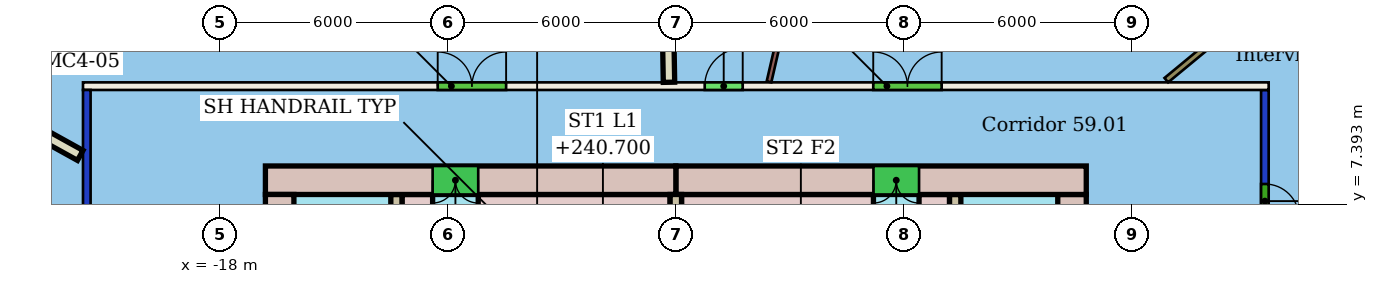
"""IFC4 building model, lengths in metres.
Left out: names, types, materials, properties, quantities, classifications, styles, units other than length and angle.
Written with IfcOpenShell. Run it as: python <this file> out.ifc"""

import sys

from ifc_helpers import new_model, si_unit, direction, frame, frame_2d, origin, place, context, subcontext, project, spatial, rectangle, extrude, element, fill, save


model = new_model("IFC4")
c1 = context("Model", 3, precision=1e-05, world=origin(), true_north=direction((0.0, 1.0)))
c2 = subcontext(c1, "Body", "Model", "MODEL_VIEW")
j1 = project(units=[si_unit("LENGTHUNIT", "METRE"), si_unit("PLANEANGLEUNIT", "RADIAN")], contexts=[c1])
p1 = place(None, origin())
s1 = spatial("IfcSite", under=j1, at=p1, CompositionType="ELEMENT")
p2 = place(p1, origin())
s2 = spatial("IfcBuilding", under=s1, at=p2, CompositionType="ELEMENT")
p3 = place(p2, frame((0.0, 0.0, 238.9)))
s3 = spatial("IfcBuildingStorey", under=s2, at=p3, CompositionType="ELEMENT", Elevation=238.9)
p4 = place(p3, frame((-21.5, -10.4, 0.0), z_axis=(0.0, 0.0, 1.0), x_axis=(0.0, 1.0, 0.0)))
e1 = element("IfcWall", 1, at=p4, inside=s3, PredefinedType="PARTITIONING", context=c2, shape_type="SweptSolid", body=[
    extrude(rectangle(XDim=20.8, YDim=0.2, at=frame_2d((10.4, 0.0))), origin(), (0.0, 0.0, 1.0), 3.0),
])
p5 = place(p4, frame((13.367, 0.0, 0.0)))
e2 = element("IfcOpeningElement", 2, at=p5, cuts=e1, PredefinedType="OPENING", context=c2, shape_type="SweptSolid", body=[
    extrude(rectangle(XDim=1.2, YDim=2.4, at=frame_2d((0.6, 1.2))), frame((0.0, 0.11, 0.0), z_axis=(0.0, -1.0, 0.0), x_axis=(1.0, 0.0, 0.0)), (0.0, 0.0, 1.0), 0.22),
])
p6 = place(p4, frame((6.326, 0.0, 0.0)))
e3 = element("IfcOpeningElement", 3, at=p6, cuts=e1, PredefinedType="OPENING", context=c2, shape_type="SweptSolid", body=[
    extrude(rectangle(XDim=1.8, YDim=2.4, at=frame_2d((0.9, 1.2))), frame((0.0, 0.11, 0.0), z_axis=(0.0, -1.0, 0.0), x_axis=(1.0, 0.0, 0.0)), (0.0, 0.0, 1.0), 0.22),
])
p7 = place(p3, frame((-21.6, 10.5, 0.0), z_axis=(0.0, 0.0, 1.0), x_axis=(1.0, 0.0, 0.0)))
e4 = element("IfcWall", 4, at=p7, inside=s3, PredefinedType="PARTITIONING", context=c2, shape_type="SweptSolid", body=[
    extrude(rectangle(XDim=31.2, YDim=0.2, at=frame_2d((15.6, 0.0))), origin(), (0.0, 0.0, 1.0), 3.4),
])
p8 = place(p7, frame((16.36, 0.0, 0.0)))
e5 = element("IfcOpeningElement", 5, at=p8, cuts=e4, PredefinedType="OPENING", context=c2, shape_type="SweptSolid", body=[
    extrude(rectangle(XDim=1.0, YDim=2.4, at=frame_2d((0.5, 1.2))), frame((0.0, 0.11, 0.0), z_axis=(0.0, -1.0, 0.0), x_axis=(1.0, 0.0, 0.0)), (0.0, 0.0, 1.0), 0.22),
])
p9 = place(p7, frame((9.334, 0.0, 0.0)))
e6 = element("IfcOpeningElement", 6, at=p9, cuts=e4, PredefinedType="OPENING", context=c2, shape_type="SweptSolid", body=[
    extrude(rectangle(XDim=1.8, YDim=2.4, at=frame_2d((0.9, 1.2))), frame((0.0, 0.11, 0.0), z_axis=(0.0, -1.0, 0.0), x_axis=(1.0, 0.0, 0.0)), (0.0, 0.0, 1.0), 0.22),
])
p10 = place(p7, frame((20.795, 0.0, 0.0)))
e7 = element("IfcOpeningElement", 7, at=p10, cuts=e4, PredefinedType="OPENING", context=c2, shape_type="SweptSolid", body=[
    extrude(rectangle(XDim=1.8, YDim=2.4, at=frame_2d((0.9, 1.2))), frame((0.0, 0.11, 0.0), z_axis=(0.0, -1.0, 0.0), x_axis=(1.0, 0.0, 0.0)), (0.0, 0.0, 1.0), 0.22),
])
p11 = place(p3, frame((9.5, 10.4, 0.0), z_axis=(0.0, 0.0, 1.0), x_axis=(0.0, -1.0, 0.0)))
e8 = element("IfcWall", 8, at=p11, inside=s3, PredefinedType="PARTITIONING", context=c2, shape_type="SweptSolid", body=[
    extrude(rectangle(XDim=20.8, YDim=0.2, at=frame_2d((10.4, 0.0))), origin(), (0.0, 0.0, 1.0), 3.0),
])
p12 = place(p11, frame((7.867, 0.0, 0.0)))
e9 = element("IfcOpeningElement", 9, at=p12, cuts=e8, PredefinedType="OPENING", context=c2, shape_type="SweptSolid", body=[
    extrude(rectangle(XDim=1.5, YDim=2.1, at=frame_2d((0.75, 1.05))), frame((0.0, 0.11, 0.0), z_axis=(0.0, -1.0, 0.0), x_axis=(1.0, 0.0, 0.0)), (0.0, 0.0, 1.0), 0.22),
])
p13 = place(p11, frame((2.474, 0.0, 0.0)))
e10 = element("IfcOpeningElement", 10, at=p13, cuts=e8, PredefinedType="OPENING", context=c2, shape_type="SweptSolid", body=[
    extrude(rectangle(XDim=0.9, YDim=2.1, at=frame_2d((0.45, 1.05))), frame((0.0, 0.11, 0.0), z_axis=(0.0, -1.0, 0.0), x_axis=(1.0, 0.0, 0.0)), (0.0, 0.0, 1.0), 0.22),
])
p14 = place(p3, frame((-0.324, 24.575, 0.0), z_axis=(0.0, 0.0, 1.0), x_axis=(-0.225044916304, -0.974348390282, 0.0)))
e11 = element("IfcWall", 11, at=p14, inside=s3, PredefinedType="PARTITIONING", context=c2, shape_type="SweptSolid", body=[
    extrude(rectangle(XDim=14.329, YDim=0.125, at=frame_2d((7.165, 0.0))), origin(), (0.0, 0.0, 1.0), 3.4),
])
p15 = place(p3, frame((-6.409, 24.047, 0.0), z_axis=(0.0, 0.0, 1.0), x_axis=(0.016994712399, -0.999855579447, 0.0)))
e12 = element("IfcWall", 12, at=p15, inside=s3, PredefinedType="PARTITIONING", context=c2, shape_type="SweptSolid", body=[
    extrude(rectangle(XDim=13.446, YDim=0.3, at=frame_2d((6.723, 0.0))), origin(), (0.0, 0.0, 1.0), 3.4),
])
p16 = place(p3, frame((-24.895, 10.462, 0.0), z_axis=(0.0, 0.0, 1.0), x_axis=(0.874850568948, -0.484392900455, 0.0)))
e13 = element("IfcWall", 13, at=p16, inside=s3, PredefinedType="PARTITIONING", context=c2, shape_type="SweptSolid", body=[
    extrude(rectangle(XDim=3.683, YDim=0.3, at=frame_2d((1.841, 0.0))), origin(), (0.0, 0.0, 1.0), 3.4),
])
p17 = place(p3, frame((17.196, 8.382, 0.0), z_axis=(0.0, 0.0, 1.0), x_axis=(-0.94047829394, -0.339853760649, 0.0)))
e14 = element("IfcWall", 14, at=p17, inside=s3, PredefinedType="PARTITIONING", context=c2, shape_type="SweptSolid", body=[
    extrude(rectangle(XDim=8.054, YDim=0.125, at=frame_2d((4.027, 0.0))), origin(), (0.0, 0.0, 1.0), 3.4),
])
p18 = place(p3, frame((14.082, 16.583, 0.0), z_axis=(0.0, 0.0, 1.0), x_axis=(-0.771079906802, -0.636738390021, 0.0)))
e15 = element("IfcWall", 15, at=p18, inside=s3, PredefinedType="PARTITIONING", context=c2, shape_type="SweptSolid", body=[
    extrude(rectangle(XDim=9.306, YDim=0.15, at=frame_2d((4.653, 0.0))), origin(), (0.0, 0.0, 1.0), 3.4),
])
p19 = place(p3, frame((4.8, 8.025, 0.0), z_axis=(0.0, 0.0, 1.0), x_axis=(-1.0, 0.0, 0.0)))
e16 = element("IfcWall", 16, at=p19, inside=s3, PredefinedType="SHEAR", context=c2, shape_type="SweptSolid", body=[
    extrude(rectangle(XDim=10.8, YDim=0.75, at=frame_2d((5.4, 0.0))), origin(), (0.0, 0.0, 1.0), 3.3),
])
p20 = place(p19, frame((4.4, 0.0, 0.0)))
e17 = element("IfcOpeningElement", 17, at=p20, cuts=e16, PredefinedType="OPENING", context=c2, shape_type="SweptSolid", body=[
    extrude(rectangle(XDim=1.2, YDim=2.1, at=frame_2d((0.6, 1.05))), frame((0.0, 0.385, 0.0), z_axis=(0.0, -1.0, 0.0), x_axis=(1.0, 0.0, 0.0)), (0.0, 0.0, 1.0), 0.77),
])
p21 = place(p3, frame((-6.0, 8.025, 0.0), z_axis=(0.0, 0.0, 1.0), x_axis=(-1.0, 0.0, 0.0)))
e18 = element("IfcWall", 18, at=p21, inside=s3, PredefinedType="SHEAR", context=c2, shape_type="SweptSolid", body=[
    extrude(rectangle(XDim=10.8, YDim=0.75, at=frame_2d((5.4, 0.0))), origin(), (0.0, 0.0, 1.0), 3.3),
])
p22 = place(p21, frame((5.2, 0.0, 0.0)))
e19 = element("IfcOpeningElement", 19, at=p22, cuts=e18, PredefinedType="OPENING", context=c2, shape_type="SweptSolid", body=[
    extrude(rectangle(XDim=1.2, YDim=2.1, at=frame_2d((0.6, 1.05))), frame((0.0, 0.385, 0.0), z_axis=(0.0, -1.0, 0.0), x_axis=(1.0, 0.0, 0.0)), (0.0, 0.0, 1.0), 0.77),
])
p23 = place(p3, frame((-16.425, 7.65, 0.0), z_axis=(0.0, 0.0, 1.0), x_axis=(0.0, -1.0, 0.0)))
e20 = element("IfcWall", 20, at=p23, inside=s3, PredefinedType="SHEAR", context=c2, shape_type="SweptSolid", body=[
    extrude(rectangle(XDim=15.3, YDim=0.75, at=frame_2d((7.65, 0.0))), origin(), (0.0, 0.0, 1.0), 3.3),
])
p24 = place(p23, frame((11.25, 0.0, 0.0)))
e21 = element("IfcOpeningElement", 21, at=p24, cuts=e20, PredefinedType="OPENING", context=c2, shape_type="SweptSolid", body=[
    extrude(rectangle(XDim=1.2, YDim=2.1, at=frame_2d((0.6, 1.05))), frame((0.0, 0.385, 0.0), z_axis=(0.0, -1.0, 0.0), x_axis=(1.0, 0.0, 0.0)), (0.0, 0.0, 1.0), 0.77),
])
p25 = place(p23, frame((2.85, 0.0, 0.0)))
e22 = element("IfcOpeningElement", 22, at=p25, cuts=e20, PredefinedType="OPENING", context=c2, shape_type="SweptSolid", body=[
    extrude(rectangle(XDim=1.2, YDim=2.1, at=frame_2d((0.6, 1.05))), frame((0.0, 0.385, 0.0), z_axis=(0.0, -1.0, 0.0), x_axis=(1.0, 0.0, 0.0)), (0.0, 0.0, 1.0), 0.77),
])
p26 = place(p3, frame((4.425, -7.65, 0.0), z_axis=(0.0, 0.0, 1.0), x_axis=(0.0, 1.0, 0.0)))
e23 = element("IfcWall", 23, at=p26, inside=s3, PredefinedType="SHEAR", context=c2, shape_type="SweptSolid", body=[
    extrude(rectangle(XDim=15.3, YDim=0.75, at=frame_2d((7.65, 0.0))), origin(), (0.0, 0.0, 1.0), 3.3),
])
p27 = place(p26, frame((2.85, 0.0, 0.0)))
e24 = element("IfcOpeningElement", 24, at=p27, cuts=e23, PredefinedType="OPENING", context=c2, shape_type="SweptSolid", body=[
    extrude(rectangle(XDim=1.2, YDim=2.1, at=frame_2d((0.6, 1.05))), frame((0.0, 0.385, 0.0), z_axis=(0.0, -1.0, 0.0), x_axis=(1.0, 0.0, 0.0)), (0.0, 0.0, 1.0), 0.77),
])
p28 = place(p26, frame((11.25, 0.0, 0.0)))
e25 = element("IfcOpeningElement", 25, at=p28, cuts=e23, PredefinedType="OPENING", context=c2, shape_type="SweptSolid", body=[
    extrude(rectangle(XDim=1.2, YDim=2.1, at=frame_2d((0.6, 1.05))), frame((0.0, 0.385, 0.0), z_axis=(0.0, -1.0, 0.0), x_axis=(1.0, 0.0, 0.0)), (0.0, 0.0, 1.0), 0.77),
])
p29 = place(p3, frame((-13.35, 7.65, 0.0), z_axis=(0.0, 0.0, 1.0), x_axis=(0.0, -1.0, 0.0)))
e26 = element("IfcWall", 26, at=p29, inside=s3, PredefinedType="SHEAR", context=c2, shape_type="SweptSolid", body=[
    extrude(rectangle(XDim=15.3, YDim=0.3, at=frame_2d((7.65, 0.0))), origin(), (0.0, 0.0, 1.0), 3.3),
])
p30 = place(p29, frame((6.9, 0.0, 0.0)))
e27 = element("IfcOpeningElement", 27, at=p30, cuts=e26, PredefinedType="OPENING", context=c2, shape_type="SweptSolid", body=[
    extrude(rectangle(XDim=1.5, YDim=2.1, at=frame_2d((0.75, 1.05))), frame((0.0, 0.16, 0.0), z_axis=(0.0, -1.0, 0.0), x_axis=(1.0, 0.0, 0.0)), (0.0, 0.0, 1.0), 0.32),
])
p31 = place(p3, frame((1.35, -7.65, 0.0), z_axis=(0.0, 0.0, 1.0), x_axis=(0.0, 1.0, 0.0)))
e28 = element("IfcWall", 28, at=p31, inside=s3, PredefinedType="SHEAR", context=c2, shape_type="SweptSolid", body=[
    extrude(rectangle(XDim=15.3, YDim=0.3, at=frame_2d((7.65, 0.0))), origin(), (0.0, 0.0, 1.0), 3.3),
])
p32 = place(p31, frame((1.56, 0.0, 0.0)))
e29 = element("IfcOpeningElement", 29, at=p32, cuts=e28, PredefinedType="OPENING", context=c2, shape_type="SweptSolid", body=[
    extrude(rectangle(XDim=1.0, YDim=2.1, at=frame_2d((0.5, 1.05))), frame((0.0, 0.16, 0.0), z_axis=(0.0, -1.0, 0.0), x_axis=(1.0, 0.0, 0.0)), (0.0, 0.0, 1.0), 0.32),
])
p33 = place(p31, frame((6.9, 0.0, 0.0)))
e30 = element("IfcOpeningElement", 30, at=p33, cuts=e28, PredefinedType="OPENING", context=c2, shape_type="SweptSolid", body=[
    extrude(rectangle(XDim=1.5, YDim=2.1, at=frame_2d((0.75, 1.05))), frame((0.0, 0.16, 0.0), z_axis=(0.0, -1.0, 0.0), x_axis=(1.0, 0.0, 0.0)), (0.0, 0.0, 1.0), 0.32),
])
p34 = place(p3, frame((-6.0, 3.88, 0.0), z_axis=(0.0, 0.0, 1.0), x_axis=(0.0, 1.0, 0.0)))
e31 = element("IfcWall", 31, at=p34, inside=s3, PredefinedType="SHEAR", context=c2, shape_type="SweptSolid", body=[
    extrude(rectangle(XDim=3.77, YDim=0.3, at=frame_2d((1.885, 0.0))), origin(), (0.0, 0.0, 1.0), 3.3),
])
p35 = place(p3, frame((-13.2, 7.475, 0.0), z_axis=(0.0, 0.0, 1.0), x_axis=(1.0, 0.0, 0.0)))
e32 = element("IfcWall", 32, at=p35, inside=s3, PredefinedType="SHEAR", context=c2, shape_type="SweptSolid", body=[
    extrude(rectangle(XDim=0.8, YDim=0.35, at=frame_2d((0.4, 0.0))), origin(), (0.0, 0.0, 1.0), 3.3),
])
for number, where, z_axis, x_axis in (
    (33, (-11.2, 7.475, 0.0), (0.0, 0.0, 1.0), (1.0, 0.0, 0.0)),
    (34, (-5.85, 7.475, 0.0), (0.0, 0.0, 1.0), (1.0, 0.0, 0.0)),
):
    element("IfcWall", number, at=place(p3, frame(where, z_axis=z_axis, x_axis=x_axis)), inside=s3, PredefinedType="SHEAR", context=c2, shape_type="SweptSolid", body=[
        extrude(rectangle(XDim=5.05, YDim=0.35, at=frame_2d((2.525, 0.0))), origin(), (0.0, 0.0, 1.0), 3.3),
    ])
p36 = place(p3, frame((0.4, 7.475, 0.0), z_axis=(0.0, 0.0, 1.0), x_axis=(1.0, 0.0, 0.0)))
e35 = element("IfcWall", 35, at=p36, inside=s3, PredefinedType="SHEAR", context=c2, shape_type="SweptSolid", body=[
    extrude(rectangle(XDim=0.8, YDim=0.35, at=frame_2d((0.4, 0.0))), origin(), (0.0, 0.0, 1.0), 3.3),
])
p37 = place(p8, origin())
e36 = element("IfcDoor", 36, at=p37, inside=s3, OperationType="SINGLE_SWING_RIGHT", PredefinedType="DOOR", context=c2, shape_type="SweptSolid", body=[
    extrude(rectangle(XDim=1.0, YDim=2.4, at=frame_2d((0.5, 1.2))), frame((0.0, 0.025, 0.0), z_axis=(0.0, -1.0, 0.0), x_axis=(1.0, 0.0, 0.0)), (0.0, 0.0, 1.0), 0.05),
])
fill(e5, e36)
p38 = place(p9, origin())
e37 = element("IfcDoor", 37, at=p38, inside=s3, OperationType="DOUBLE_DOOR_SINGLE_SWING", PredefinedType="DOOR", context=c2, shape_type="SweptSolid", body=[
    extrude(rectangle(XDim=1.8, YDim=2.4, at=frame_2d((0.9, 1.2))), frame((0.0, 0.025, 0.0), z_axis=(0.0, -1.0, 0.0), x_axis=(1.0, 0.0, 0.0)), (0.0, 0.0, 1.0), 0.05),
])
fill(e6, e37)
p39 = place(p13, origin())
e38 = element("IfcDoor", 38, at=p39, inside=s3, OperationType="SINGLE_SWING_RIGHT", PredefinedType="DOOR", context=c2, shape_type="SweptSolid", body=[
    extrude(rectangle(XDim=0.9, YDim=2.1, at=frame_2d((0.45, 1.05))), frame((0.0, 0.025, 0.0), z_axis=(0.0, -1.0, 0.0), x_axis=(1.0, 0.0, 0.0)), (0.0, 0.0, 1.0), 0.05),
])
fill(e10, e38)
p40 = place(p10, origin())
e39 = element("IfcDoor", 39, at=p40, inside=s3, OperationType="DOUBLE_DOOR_SINGLE_SWING", PredefinedType="DOOR", context=c2, shape_type="SweptSolid", body=[
    extrude(rectangle(XDim=1.8, YDim=2.4, at=frame_2d((0.9, 1.2))), frame((0.0, 0.025, 0.0), z_axis=(0.0, -1.0, 0.0), x_axis=(1.0, 0.0, 0.0)), (0.0, 0.0, 1.0), 0.05),
])
fill(e7, e39)
p41 = place(p20, origin())
e40 = element("IfcDoor", 40, at=p41, inside=s3, OperationType="DOUBLE_DOOR_SINGLE_SWING", PredefinedType="NOTDEFINED", context=c2, shape_type="SweptSolid", body=[
    extrude(rectangle(XDim=1.2, YDim=2.1, at=frame_2d((0.6, 1.05))), frame((0.0, 0.025, 0.0), z_axis=(0.0, -1.0, 0.0), x_axis=(1.0, 0.0, 0.0)), (0.0, 0.0, 1.0), 0.05),
])
fill(e17, e40)
p42 = place(p22, origin())
e41 = element("IfcDoor", 41, at=p42, inside=s3, OperationType="DOUBLE_DOOR_SINGLE_SWING", PredefinedType="NOTDEFINED", context=c2, shape_type="SweptSolid", body=[
    extrude(rectangle(XDim=1.2, YDim=2.1, at=frame_2d((0.6, 1.05))), frame((0.0, 0.025, 0.0), z_axis=(0.0, -1.0, 0.0), x_axis=(1.0, 0.0, 0.0)), (0.0, 0.0, 1.0), 0.05),
])
fill(e19, e41)
save(model, sys.argv[1])
